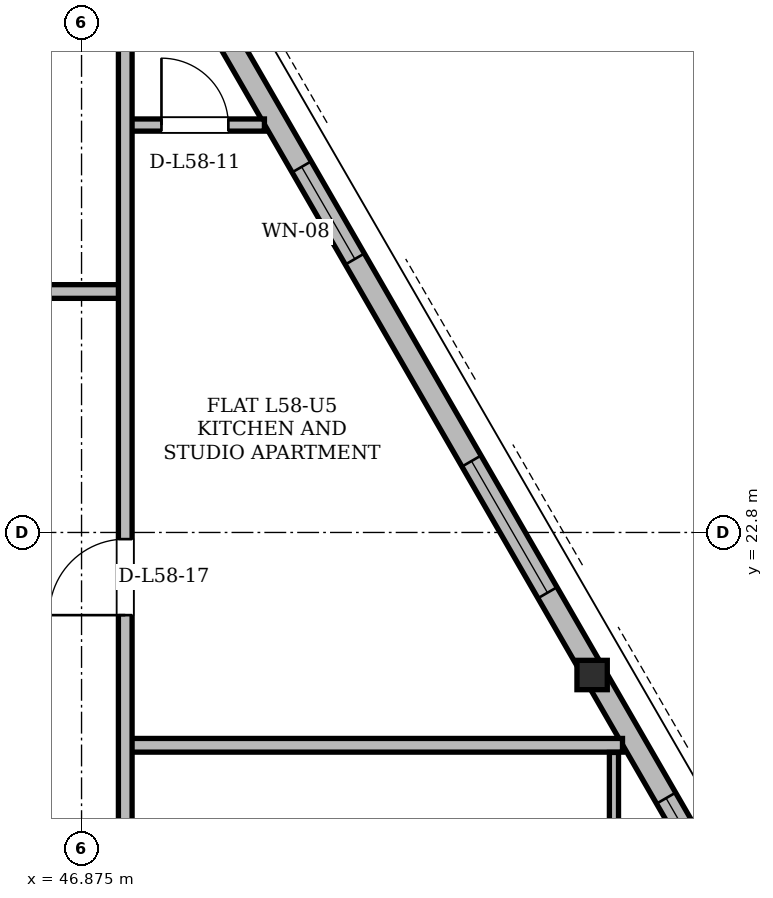
"""IFC4 building model, lengths in metres.
Left out: names, types, materials, properties, quantities, classifications, styles, units other than length and angle.
Written with IfcOpenShell. Run it as: python <this file> out.ifc"""

import sys

from ifc_helpers import new_model, si_unit, direction, frame, frame_2d, origin, origin_2d, place, context, subcontext, project, spatial, rectangle, i_section, extrude, element, fill, save


model = new_model("IFC4")
c1 = context("Model", 3, precision=1e-05, world=origin(), true_north=direction((0.0, 1.0)))
c2 = subcontext(c1, "Body", "Model", "MODEL_VIEW")
j1 = project(units=[si_unit("LENGTHUNIT", "METRE"), si_unit("PLANEANGLEUNIT", "RADIAN")], contexts=[c1])
p1 = place(None, origin())
s1 = spatial("IfcSite", under=j1, at=p1, CompositionType="ELEMENT")
p2 = place(p1, origin())
s2 = spatial("IfcBuilding", under=s1, at=p2, CompositionType="ELEMENT")
p3 = place(p2, frame((0.0, 0.0, 219.9)))
s3 = spatial("IfcBuildingStorey", under=s2, at=p3, CompositionType="ELEMENT", Elevation=219.9)
p4 = place(p3, frame((53.618, 20.946, 0.005), z_axis=(-0.01434247988, -0.011827447863, 0.999827187442), x_axis=(0.636219767536, -0.771507879024, 0.0)))
e1 = element("IfcColumn", 1, at=p4, inside=s3, PredefinedType="COLUMN", context=c2, shape_type="SweptSolid", body=[
    extrude(i_section(OverallWidth=0.399, OverallDepth=0.386, WebThickness=0.021, FlangeThickness=0.033, at=origin_2d()), origin(), (0.0, 0.0, 1.0), 3.592),
])
p5 = place(p3, frame((59.113, 11.428, 0.0), z_axis=(0.0, 0.0, 1.0), x_axis=(-0.499994551211, 0.866028549621, 0.0)))
e2 = element("IfcWall", 2, at=p5, inside=s3, PredefinedType="SOLIDWALL", context=c2, shape_type="SweptSolid", body=[
    extrude(rectangle(XDim=36.634, YDim=0.29, at=frame_2d((18.317, 0.0))), origin(), (0.0, 0.0, 1.0), 2.677),
])
p6 = place(p5, frame((3.429, 0.0, 0.0)))
e3 = element("IfcOpeningElement", 3, at=p6, cuts=e2, PredefinedType="OPENING", context=c2, shape_type="SweptSolid", body=[
    extrude(rectangle(XDim=1.5, YDim=2.2, at=frame_2d((0.75, 1.1))), frame((0.0, 0.145, 0.0), z_axis=(0.0, -1.0, 0.0), x_axis=(1.0, 0.0, 0.0)), (0.0, 0.0, 1.0), 0.29),
])
p7 = place(p5, frame((27.099, 0.0, 0.0)))
e4 = element("IfcOpeningElement", 4, at=p7, cuts=e2, PredefinedType="OPENING", context=c2, shape_type="SweptSolid", body=[
    extrude(rectangle(XDim=1.5, YDim=2.2, at=frame_2d((0.75, 1.1))), frame((0.0, 0.145, 0.0), z_axis=(0.0, -1.0, 0.0), x_axis=(1.0, 0.0, 0.0)), (0.0, 0.0, 1.0), 0.29),
])
p8 = place(p5, frame((7.895, 0.0, 0.85)))
e5 = element("IfcOpeningElement", 5, at=p8, cuts=e2, PredefinedType="OPENING", context=c2, shape_type="SweptSolid", body=[
    extrude(rectangle(XDim=1.2, YDim=1.48, at=frame_2d((0.6, 0.74))), frame((0.0, 0.145, 0.0), z_axis=(0.0, -1.0, 0.0), x_axis=(1.0, 0.0, 0.0)), (0.0, 0.0, 1.0), 0.29),
])
p9 = place(p5, frame((1.262, 0.0, 0.85)))
e6 = element("IfcOpeningElement", 6, at=p9, cuts=e2, PredefinedType="OPENING", context=c2, shape_type="SweptSolid", body=[
    extrude(rectangle(XDim=1.2, YDim=1.48, at=frame_2d((0.6, 0.74))), frame((0.0, 0.145, 0.0), z_axis=(0.0, -1.0, 0.0), x_axis=(1.0, 0.0, 0.0)), (0.0, 0.0, 1.0), 0.29),
])
p10 = place(p5, frame((12.216, 0.0, 0.85)))
e7 = element("IfcOpeningElement", 7, at=p10, cuts=e2, PredefinedType="OPENING", context=c2, shape_type="SweptSolid", body=[
    extrude(rectangle(XDim=2.0, YDim=1.717, at=frame_2d((1.0, 0.858))), frame((0.0, 0.145, 0.0), z_axis=(0.0, -1.0, 0.0), x_axis=(1.0, 0.0, 0.0)), (0.0, 0.0, 1.0), 0.29),
])
p11 = place(p5, frame((17.285, 0.0, 0.85)))
e8 = element("IfcOpeningElement", 8, at=p11, cuts=e2, PredefinedType="OPENING", context=c2, shape_type="SweptSolid", body=[
    extrude(rectangle(XDim=1.4, YDim=1.6, at=frame_2d((0.7, 0.8))), frame((0.0, 0.145, 0.0), z_axis=(0.0, -1.0, 0.0), x_axis=(1.0, 0.0, 0.0)), (0.0, 0.0, 1.0), 0.29),
])
p12 = place(p5, frame((20.673, 0.0, 0.85)))
e9 = element("IfcOpeningElement", 9, at=p12, cuts=e2, PredefinedType="OPENING", context=c2, shape_type="SweptSolid", body=[
    extrude(rectangle(XDim=1.2, YDim=1.48, at=frame_2d((0.6, 0.74))), frame((0.0, 0.145, 0.0), z_axis=(0.0, -1.0, 0.0), x_axis=(1.0, 0.0, 0.0)), (0.0, 0.0, 1.0), 0.29),
])
p13 = place(p5, frame((34.257, 0.0, 0.85)))
e10 = element("IfcOpeningElement", 10, at=p13, cuts=e2, PredefinedType="OPENING", context=c2, shape_type="SweptSolid", body=[
    extrude(rectangle(XDim=1.2, YDim=1.48, at=frame_2d((0.6, 0.74))), frame((0.0, 0.145, 0.0), z_axis=(0.0, -1.0, 0.0), x_axis=(1.0, 0.0, 0.0)), (0.0, 0.0, 1.0), 0.29),
])
p14 = place(p3, frame((47.45, 20.0, 0.0), z_axis=(0.0, 0.0, 1.0), x_axis=(1.0, 0.0, 0.0)))
e11 = element("IfcWall", 11, at=p14, inside=s3, PredefinedType="PARTITIONING", context=c2, shape_type="SweptSolid", body=[
    extrude(rectangle(XDim=6.542, YDim=0.18, at=frame_2d((3.271, 0.0))), origin(), (0.0, 0.0, 1.0), 3.38),
])
p15 = place(p3, frame((25.6, 25.97, 0.0), z_axis=(0.0, 0.0, 1.0), x_axis=(1.0, 0.0, 0.0)))
e12 = element("IfcWall", 12, at=p15, inside=s3, PredefinedType="PARTITIONING", context=c2, shape_type="SweptSolid", body=[
    extrude(rectangle(XDim=21.85, YDim=0.18, at=frame_2d((10.925, 0.0))), origin(), (0.0, 0.0, 1.0), 2.913),
])
p16 = place(p15, frame((5.347, 0.0, 0.0)))
e13 = element("IfcOpeningElement", 13, at=p16, cuts=e12, PredefinedType="OPENING", context=c2, shape_type="SweptSolid", body=[
    extrude(rectangle(XDim=1.0, YDim=2.18, at=frame_2d((0.5, 1.09))), frame((0.0, 0.09, 0.0), z_axis=(0.0, -1.0, 0.0), x_axis=(1.0, 0.0, 0.0)), (0.0, 0.0, 1.0), 0.18),
])
p17 = place(p15, frame((15.35, 0.0, 0.0)))
e14 = element("IfcOpeningElement", 14, at=p17, cuts=e12, PredefinedType="OPENING", context=c2, shape_type="SweptSolid", body=[
    extrude(rectangle(XDim=1.3, YDim=2.2, at=frame_2d((0.65, 1.1))), frame((0.0, 0.09, 0.0), z_axis=(0.0, -1.0, 0.0), x_axis=(1.0, 0.0, 0.0)), (0.0, 0.0, 1.0), 0.18),
])
p18 = place(p15, frame((18.94, 0.0, 0.0)))
e15 = element("IfcOpeningElement", 15, at=p18, cuts=e12, PredefinedType="OPENING", context=c2, shape_type="SweptSolid", body=[
    extrude(rectangle(XDim=1.0, YDim=2.18, at=frame_2d((0.5, 1.09))), frame((0.0, 0.09, 0.0), z_axis=(0.0, -1.0, 0.0), x_axis=(1.0, 0.0, 0.0)), (0.0, 0.0, 1.0), 0.18),
])
p19 = place(p3, frame((47.368, 28.16, 0.0), z_axis=(0.0, 0.0, 1.0), x_axis=(1.0, 0.0, 0.0)))
e16 = element("IfcWall", 16, at=p19, inside=s3, PredefinedType="PARTITIONING", context=c2, shape_type="SweptSolid", body=[
    extrude(rectangle(XDim=1.913, YDim=0.16, at=frame_2d((0.957, 0.0))), origin(), (0.0, 0.0, 1.0), 3.38),
])
p20 = place(p19, frame((0.559, 0.0, 0.0)))
e17 = element("IfcOpeningElement", 17, at=p20, cuts=e16, PredefinedType="OPENING", context=c2, shape_type="SweptSolid", body=[
    extrude(rectangle(XDim=0.88, YDim=2.08, at=frame_2d((0.44, 1.04))), frame((0.0, 0.08, 0.0), z_axis=(0.0, -1.0, 0.0), x_axis=(1.0, 0.0, 0.0)), (0.0, 0.0, 1.0), 0.16),
])
p21 = place(p3, frame((47.45, 5.867, 0.0), z_axis=(0.0, 0.0, 1.0), x_axis=(0.0, 1.0, 0.0)))
e18 = element("IfcWall", 18, at=p21, inside=s3, PredefinedType="PARTITIONING", context=c2, shape_type="SweptSolid", body=[
    extrude(rectangle(XDim=25.465, YDim=0.18, at=frame_2d((12.732, 0.0))), origin(), (0.0, 0.0, 1.0), 2.913),
])
p22 = place(p21, frame((9.055, 0.0, 0.0)))
e19 = element("IfcOpeningElement", 19, at=p22, cuts=e18, PredefinedType="OPENING", context=c2, shape_type="SweptSolid", body=[
    extrude(rectangle(XDim=1.0, YDim=2.18, at=frame_2d((0.5, 1.09))), frame((0.0, 0.09, 0.0), z_axis=(0.0, -1.0, 0.0), x_axis=(1.0, 0.0, 0.0)), (0.0, 0.0, 1.0), 0.18),
])
p23 = place(p21, frame((15.845, 0.0, 0.0)))
e20 = element("IfcOpeningElement", 20, at=p23, cuts=e18, PredefinedType="OPENING", context=c2, shape_type="SweptSolid", body=[
    extrude(rectangle(XDim=1.0, YDim=2.18, at=frame_2d((0.5, 1.09))), frame((0.0, 0.09, 0.0), z_axis=(0.0, -1.0, 0.0), x_axis=(1.0, 0.0, 0.0)), (0.0, 0.0, 1.0), 0.18),
])
p24 = place(p3, frame((53.88, 5.867, 0.0), z_axis=(0.0, 0.0, 1.0), x_axis=(0.0, 1.0, 0.0)))
e21 = element("IfcWall", 21, at=p24, inside=s3, PredefinedType="PARTITIONING", context=c2, shape_type="SweptSolid", body=[
    extrude(rectangle(XDim=14.039, YDim=0.12, at=frame_2d((7.02, 0.0))), origin(), (0.0, 0.0, 1.0), 2.913),
])
p25 = place(p24, frame((0.706, 0.0, 0.0)))
e22 = element("IfcOpeningElement", 22, at=p25, cuts=e21, PredefinedType="OPENING", context=c2, shape_type="SweptSolid", body=[
    extrude(rectangle(XDim=0.88, YDim=2.08, at=frame_2d((0.44, 1.04))), frame((0.0, 0.06, 0.0), z_axis=(0.0, -1.0, 0.0), x_axis=(1.0, 0.0, 0.0)), (0.0, 0.0, 1.0), 0.12),
])
p26 = place(p24, frame((3.014, 0.0, 0.0)))
e23 = element("IfcOpeningElement", 23, at=p26, cuts=e21, PredefinedType="OPENING", context=c2, shape_type="SweptSolid", body=[
    extrude(rectangle(XDim=0.95, YDim=2.1, at=frame_2d((0.475, 1.05))), frame((0.0, 0.06, 0.0), z_axis=(0.0, -1.0, 0.0), x_axis=(1.0, 0.0, 0.0)), (0.0, 0.0, 1.0), 0.12),
])
p27 = place(p24, frame((8.95, 0.0, 0.0)))
e24 = element("IfcOpeningElement", 24, at=p27, cuts=e21, PredefinedType="OPENING", context=c2, shape_type="SweptSolid", body=[
    extrude(rectangle(XDim=0.92, YDim=2.12, at=frame_2d((0.46, 1.06))), frame((0.0, 0.06, 0.0), z_axis=(0.0, -1.0, 0.0), x_axis=(1.0, 0.0, 0.0)), (0.0, 0.0, 1.0), 0.12),
])
p28 = place(p8, origin())
e25 = element("IfcWindow", 25, at=p28, inside=s3, PartitioningType="SINGLE_PANEL", PredefinedType="WINDOW", context=c2, shape_type="SweptSolid", body=[
    extrude(rectangle(XDim=1.2, YDim=1.48, at=frame_2d((0.6, 0.74))), frame((0.0, 0.03, 0.0), z_axis=(0.0, -1.0, 0.0), x_axis=(1.0, 0.0, 0.0)), (0.0, 0.0, 1.0), 0.06),
])
fill(e5, e25)
p29 = place(p10, origin())
e26 = element("IfcWindow", 26, at=p29, inside=s3, PartitioningType="SINGLE_PANEL", PredefinedType="WINDOW", context=c2, shape_type="SweptSolid", body=[
    extrude(rectangle(XDim=2.0, YDim=1.717, at=frame_2d((1.0, 0.858))), frame((0.0, 0.03, 0.0), z_axis=(0.0, -1.0, 0.0), x_axis=(1.0, 0.0, 0.0)), (0.0, 0.0, 1.0), 0.06),
])
fill(e7, e26)
p30 = place(p11, origin())
e27 = element("IfcWindow", 27, at=p30, inside=s3, PartitioningType="SINGLE_PANEL", PredefinedType="WINDOW", context=c2, shape_type="SweptSolid", body=[
    extrude(rectangle(XDim=1.4, YDim=1.6, at=frame_2d((0.7, 0.8))), frame((0.0, 0.03, 0.0), z_axis=(0.0, -1.0, 0.0), x_axis=(1.0, 0.0, 0.0)), (0.0, 0.0, 1.0), 0.06),
])
fill(e8, e27)
p31 = place(p20, origin())
e28 = element("IfcDoor", 28, at=p31, inside=s3, OperationType="SINGLE_SWING_LEFT", PredefinedType="DOOR", context=c2, shape_type="SweptSolid", body=[
    extrude(rectangle(XDim=0.88, YDim=2.08, at=frame_2d((0.44, 1.04))), frame((0.0, 0.025, 0.0), z_axis=(0.0, -1.0, 0.0), x_axis=(1.0, 0.0, 0.0)), (0.0, 0.0, 1.0), 0.05),
])
fill(e17, e28)
p32 = place(p23, origin())
e29 = element("IfcDoor", 29, at=p32, inside=s3, OperationType="SINGLE_SWING_LEFT", PredefinedType="DOOR", context=c2, shape_type="SweptSolid", body=[
    extrude(rectangle(XDim=1.0, YDim=2.18, at=frame_2d((0.5, 1.09))), frame((0.0, 0.025, 0.0), z_axis=(0.0, -1.0, 0.0), x_axis=(1.0, 0.0, 0.0)), (0.0, 0.0, 1.0), 0.05),
])
fill(e20, e29)
save(model, sys.argv[1])
